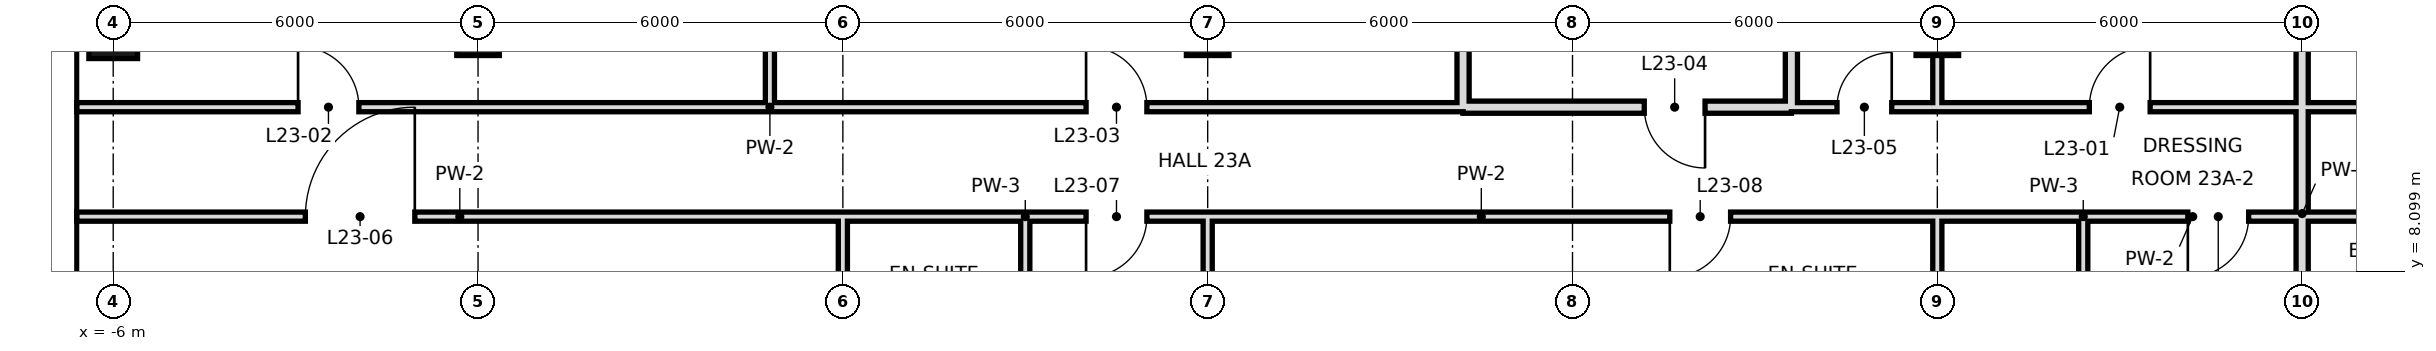
"""IFC4 building model, lengths in metres.
Left out: names, types, materials, properties, quantities, classifications, styles, units other than length and angle.
Written with IfcOpenShell. Run it as: python <this file> out.ifc"""

import sys

from ifc_helpers import new_model, si_unit, direction, frame, frame_2d, origin, origin_2d, place, context, subcontext, project, spatial, rectangle, hollow_rectangle, extrude, element, fill, save


model = new_model("IFC4")
c1 = context("Model", 3, precision=1e-05, world=origin(), true_north=direction((0.0, 1.0)))
c2 = subcontext(c1, "Body", "Model", "MODEL_VIEW")
j1 = project(units=[si_unit("LENGTHUNIT", "METRE"), si_unit("PLANEANGLEUNIT", "RADIAN")], contexts=[c1])
p1 = place(None, origin())
s1 = spatial("IfcSite", under=j1, at=p1, CompositionType="ELEMENT")
p2 = place(p1, origin())
s2 = spatial("IfcBuilding", under=s1, at=p2, CompositionType="ELEMENT")
p3 = place(p2, frame((0.0, 0.0, 107.0)))
s3 = spatial("IfcBuildingStorey", under=s2, at=p3, CompositionType="ELEMENT", Elevation=107.0)
p4 = place(p3, frame((-6.0, 12.0, 0.0), z_axis=(0.0, 0.0, 1.0), x_axis=(1.0, 0.0, 0.0)))
e1 = element("IfcColumn", 1, at=p4, inside=s3, PredefinedType="COLUMN", context=c2, shape_type="SweptSolid", body=[
    extrude(hollow_rectangle(XDim=0.8, YDim=0.8, WallThickness=0.04, at=origin_2d()), origin(), (0.0, 0.0, 1.0), 3.6),
])
for number, where, z_axis, x_axis in (
    (2, (0.0, 12.0, 0.0), (0.0, 0.0, 1.0), (1.0, 0.0, 0.0)),
    (3, (12.0, 12.0, 0.0), (0.0, 0.0, 1.0), (1.0, 0.0, 0.0)),
    (4, (24.0, 12.0, 0.0), (0.0, 0.0, 1.0), (1.0, 0.0, 0.0)),
):
    element("IfcColumn", number, at=place(p3, frame(where, z_axis=z_axis, x_axis=x_axis)), inside=s3, PredefinedType="COLUMN", context=c2, shape_type="SweptSolid", body=[
        extrude(hollow_rectangle(XDim=0.7, YDim=0.7, WallThickness=0.036, at=origin_2d()), origin(), (0.0, 0.0, 1.0), 3.6),
    ])
p5 = place(p3, frame((12.0, 0.0, 0.0), z_axis=(0.0, 0.0, 1.0), x_axis=(0.0, 1.0, 0.0)))
e5 = element("IfcWall", 5, at=p5, inside=s3, PredefinedType="PARTITIONING", context=c2, shape_type="SweptSolid", body=[
    extrude(rectangle(XDim=9.0, YDim=0.15, at=frame_2d((4.5, 0.0))), origin(), (0.0, 0.0, 1.0), 2.72),
])
for number, where, z_axis, x_axis in (
    (6, (16.2, 10.8, 0.0), (0.0, 0.0, 1.0), (0.0, 1.0, 0.0)),
    (7, (21.6, 10.8, 0.0), (0.0, 0.0, 1.0), (0.0, 1.0, 0.0)),
):
    element("IfcWall", number, at=place(p3, frame(where, z_axis=z_axis, x_axis=x_axis)), inside=s3, PredefinedType="SOLIDWALL", context=c2, shape_type="SweptSolid", body=[
        extrude(rectangle(XDim=7.9, YDim=0.2, at=frame_2d((3.95, 0.0))), origin(), (0.0, 0.0, 1.0), 2.72),
    ])
p6 = place(p3, frame((24.0, 6.0, 0.0), z_axis=(0.0, 0.0, 1.0), x_axis=(0.0, 1.0, 0.0)))
e8 = element("IfcWall", 8, at=p6, inside=s3, PredefinedType="PARTITIONING", context=c2, shape_type="SweptSolid", body=[
    extrude(rectangle(XDim=3.0, YDim=0.15, at=frame_2d((1.5, 0.0))), origin(), (0.0, 0.0, 1.0), 2.72),
])
p7 = place(p3, frame((24.0, 10.8, 0.0), z_axis=(0.0, 0.0, 1.0), x_axis=(0.0, 1.0, 0.0)))
e9 = element("IfcWall", 9, at=p7, inside=s3, PredefinedType="PARTITIONING", context=c2, shape_type="SweptSolid", body=[
    extrude(rectangle(XDim=7.9, YDim=0.15, at=frame_2d((3.95, 0.0))), origin(), (0.0, 0.0, 1.0), 2.72),
])
p8 = place(p3, frame((26.4, 6.0, 0.0), z_axis=(0.0, 0.0, 1.0), x_axis=(0.0, 1.0, 0.0)))
e10 = element("IfcWall", 10, at=p8, inside=s3, PredefinedType="PARTITIONING", context=c2, shape_type="SweptSolid", body=[
    extrude(rectangle(XDim=3.0, YDim=0.15, at=frame_2d((1.5, 0.0))), origin(), (0.0, 0.0, 1.0), 3.42),
])
p9 = place(p3, frame((30.0, -0.6, 0.0), z_axis=(0.0, 0.0, 1.0), x_axis=(0.0, 1.0, 0.0)))
e11 = element("IfcWall", 11, at=p9, inside=s3, PredefinedType="SOLIDWALL", context=c2, shape_type="SweptSolid", body=[
    extrude(rectangle(XDim=19.3, YDim=0.2, at=frame_2d((9.65, 0.0))), origin(), (0.0, 0.0, 1.0), 2.72),
])
p10 = place(p3, frame((4.8, 10.8, 0.0), z_axis=(0.0, 0.0, 1.0), x_axis=(0.0, 1.0, 0.0)))
e12 = element("IfcWall", 12, at=p10, inside=s3, PredefinedType="PARTITIONING", context=c2, shape_type="SweptSolid", body=[
    extrude(rectangle(XDim=7.9, YDim=0.15, at=frame_2d((3.95, 0.0))), origin(), (0.0, 0.0, 1.0), 3.42),
])
p11 = place(p3, frame((6.0, 6.0, 0.0), z_axis=(0.0, 0.0, 1.0), x_axis=(0.0, 1.0, 0.0)))
e13 = element("IfcWall", 13, at=p11, inside=s3, PredefinedType="PARTITIONING", context=c2, shape_type="SweptSolid", body=[
    extrude(rectangle(XDim=3.0, YDim=0.15, at=frame_2d((1.5, 0.0))), origin(), (0.0, 0.0, 1.0), 2.72),
])
p12 = place(p3, frame((9.0, 6.0, 0.0), z_axis=(0.0, 0.0, 1.0), x_axis=(0.0, 1.0, 0.0)))
e14 = element("IfcWall", 14, at=p12, inside=s3, PredefinedType="PARTITIONING", context=c2, shape_type="SweptSolid", body=[
    extrude(rectangle(XDim=3.0, YDim=0.15, at=frame_2d((1.5, 0.0))), origin(), (0.0, 0.0, 1.0), 3.42),
])
p13 = place(p3, frame((16.2, 10.8, 0.0), z_axis=(0.0, 0.0, 1.0), x_axis=(1.0, 0.0, 0.0)))
e15 = element("IfcWall", 15, at=p13, inside=s3, PredefinedType="SOLIDWALL", context=c2, shape_type="SweptSolid", body=[
    extrude(rectangle(XDim=5.4, YDim=0.2, at=frame_2d((2.7, 0.0))), origin(), (0.0, 0.0, 1.0), 2.72),
])
p14 = place(p13, frame((2.98, 0.0, 0.0)))
e16 = element("IfcOpeningElement", 16, at=p14, cuts=e15, PredefinedType="OPENING", context=c2, shape_type="SweptSolid", body=[
    extrude(rectangle(XDim=1.0, YDim=2.4, at=frame_2d((0.5, 1.2))), frame((0.0, 0.11, 0.0), z_axis=(0.0, -1.0, 0.0), x_axis=(1.0, 0.0, 0.0)), (0.0, 0.0, 1.0), 0.22),
])
p15 = place(p3, frame((-6.6, 10.8, 0.0), z_axis=(0.0, 0.0, 1.0), x_axis=(1.0, 0.0, 0.0)))
e17 = element("IfcWall", 17, at=p15, inside=s3, PredefinedType="PARTITIONING", context=c2, shape_type="SweptSolid", body=[
    extrude(rectangle(XDim=22.8, YDim=0.15, at=frame_2d((11.4, 0.0))), origin(), (0.0, 0.0, 1.0), 3.42),
])
p16 = place(p15, frame((3.64, 0.0, 0.0)))
e18 = element("IfcOpeningElement", 18, at=p16, cuts=e17, PredefinedType="OPENING", context=c2, shape_type="SweptSolid", body=[
    extrude(rectangle(XDim=1.0, YDim=2.4, at=frame_2d((0.5, 1.2))), frame((0.0, 0.085, 0.0), z_axis=(0.0, -1.0, 0.0), x_axis=(1.0, 0.0, 0.0)), (0.0, 0.0, 1.0), 0.17),
])
p17 = place(p15, frame((16.6, 0.0, 0.0)))
e19 = element("IfcOpeningElement", 19, at=p17, cuts=e17, PredefinedType="OPENING", context=c2, shape_type="SweptSolid", body=[
    extrude(rectangle(XDim=1.0, YDim=2.4, at=frame_2d((0.5, 1.2))), frame((0.0, 0.085, 0.0), z_axis=(0.0, -1.0, 0.0), x_axis=(1.0, 0.0, 0.0)), (0.0, 0.0, 1.0), 0.17),
])
p18 = place(p3, frame((24.0, 10.8, 0.0), z_axis=(0.0, 0.0, 1.0), x_axis=(1.0, 0.0, 0.0)))
e20 = element("IfcWall", 20, at=p18, inside=s3, PredefinedType="PARTITIONING", context=c2, shape_type="SweptSolid", body=[
    extrude(rectangle(XDim=18.0, YDim=0.15, at=frame_2d((9.0, 0.0))), origin(), (0.0, 0.0, 1.0), 3.42),
])
p19 = place(p18, frame((2.5, 0.0, 0.0)))
e21 = element("IfcOpeningElement", 21, at=p19, cuts=e20, PredefinedType="OPENING", context=c2, shape_type="SweptSolid", body=[
    extrude(rectangle(XDim=1.0, YDim=2.4, at=frame_2d((0.5, 1.2))), frame((0.0, 0.085, 0.0), z_axis=(0.0, -1.0, 0.0), x_axis=(1.0, 0.0, 0.0)), (0.0, 0.0, 1.0), 0.17),
])
p20 = place(p18, frame((15.4, 0.0, 0.0)))
e22 = element("IfcOpeningElement", 22, at=p20, cuts=e20, PredefinedType="OPENING", context=c2, shape_type="SweptSolid", body=[
    extrude(rectangle(XDim=1.0, YDim=2.4, at=frame_2d((0.5, 1.2))), frame((0.0, 0.085, 0.0), z_axis=(0.0, -1.0, 0.0), x_axis=(1.0, 0.0, 0.0)), (0.0, 0.0, 1.0), 0.17),
])
p21 = place(p18, frame((8.55, 0.0, 0.0)))
e23 = element("IfcOpeningElement", 23, at=p21, cuts=e20, PredefinedType="OPENING", context=c2, shape_type="SweptSolid", body=[
    extrude(rectangle(XDim=0.9, YDim=2.1, at=frame_2d((0.45, 1.05))), frame((0.0, 0.085, 0.0), z_axis=(0.0, -1.0, 0.0), x_axis=(1.0, 0.0, 0.0)), (0.0, 0.0, 1.0), 0.17),
])
p22 = place(p3, frame((21.6, 10.8, 0.0), z_axis=(0.0, 0.0, 1.0), x_axis=(1.0, 0.0, 0.0)))
e24 = element("IfcWall", 24, at=p22, inside=s3, PredefinedType="PARTITIONING", context=c2, shape_type="SweptSolid", body=[
    extrude(rectangle(XDim=2.4, YDim=0.15, at=frame_2d((1.2, 0.0))), origin(), (0.0, 0.0, 1.0), 3.42),
])
p23 = place(p22, frame((0.75, 0.0, 0.0)))
e25 = element("IfcOpeningElement", 25, at=p23, cuts=e24, PredefinedType="OPENING", context=c2, shape_type="SweptSolid", body=[
    extrude(rectangle(XDim=0.9, YDim=2.4, at=frame_2d((0.45, 1.2))), frame((0.0, 0.085, 0.0), z_axis=(0.0, -1.0, 0.0), x_axis=(1.0, 0.0, 0.0)), (0.0, 0.0, 1.0), 0.17),
])
p24 = place(p3, frame((-6.6, 9.0, 0.0), z_axis=(0.0, 0.0, 1.0), x_axis=(1.0, 0.0, 0.0)))
e26 = element("IfcWall", 26, at=p24, inside=s3, PredefinedType="PARTITIONING", context=c2, shape_type="SweptSolid", body=[
    extrude(rectangle(XDim=12.6, YDim=0.15, at=frame_2d((6.3, 0.0))), origin(), (0.0, 0.0, 1.0), 3.42),
])
p25 = place(p24, frame((3.76, 0.0, 0.0)))
e27 = element("IfcOpeningElement", 27, at=p25, cuts=e26, PredefinedType="OPENING", context=c2, shape_type="SweptSolid", body=[
    extrude(rectangle(XDim=1.8, YDim=2.4, at=frame_2d((0.9, 1.2))), frame((0.0, 0.085, 0.0), z_axis=(0.0, -1.0, 0.0), x_axis=(1.0, 0.0, 0.0)), (0.0, 0.0, 1.0), 0.17),
])
p26 = place(p3, frame((9.0, 9.0, 0.0), z_axis=(0.0, 0.0, 1.0), x_axis=(1.0, 0.0, 0.0)))
e28 = element("IfcWall", 28, at=p26, inside=s3, PredefinedType="PARTITIONING", context=c2, shape_type="SweptSolid", body=[
    extrude(rectangle(XDim=15.0, YDim=0.15, at=frame_2d((7.5, 0.0))), origin(), (0.0, 0.0, 1.0), 3.42),
])
p27 = place(p26, frame((1.0, 0.0, 0.0)))
e29 = element("IfcOpeningElement", 29, at=p27, cuts=e28, PredefinedType="OPENING", context=c2, shape_type="SweptSolid", body=[
    extrude(rectangle(XDim=1.0, YDim=2.4, at=frame_2d((0.5, 1.2))), frame((0.0, 0.085, 0.0), z_axis=(0.0, -1.0, 0.0), x_axis=(1.0, 0.0, 0.0)), (0.0, 0.0, 1.0), 0.17),
])
p28 = place(p26, frame((10.6, 0.0, 0.0)))
e30 = element("IfcOpeningElement", 30, at=p28, cuts=e28, PredefinedType="OPENING", context=c2, shape_type="SweptSolid", body=[
    extrude(rectangle(XDim=1.0, YDim=2.4, at=frame_2d((0.5, 1.2))), frame((0.0, 0.085, 0.0), z_axis=(0.0, -1.0, 0.0), x_axis=(1.0, 0.0, 0.0)), (0.0, 0.0, 1.0), 0.17),
])
p29 = place(p3, frame((26.4, 9.0, 0.0), z_axis=(0.0, 0.0, 1.0), x_axis=(1.0, 0.0, 0.0)))
e31 = element("IfcWall", 31, at=p29, inside=s3, PredefinedType="PARTITIONING", context=c2, shape_type="SweptSolid", body=[
    extrude(rectangle(XDim=3.6, YDim=0.15, at=frame_2d((1.8, 0.0))), origin(), (0.0, 0.0, 1.0), 3.42),
])
p30 = place(p29, frame((1.72, 0.0, 0.0)))
e32 = element("IfcOpeningElement", 32, at=p30, cuts=e31, PredefinedType="OPENING", context=c2, shape_type="SweptSolid", body=[
    extrude(rectangle(XDim=1.0, YDim=2.4, at=frame_2d((0.5, 1.2))), frame((0.0, 0.085, 0.0), z_axis=(0.0, -1.0, 0.0), x_axis=(1.0, 0.0, 0.0)), (0.0, 0.0, 1.0), 0.17),
])
p31 = place(p3, frame((6.0, 9.0, 0.0), z_axis=(0.0, 0.0, 1.0), x_axis=(1.0, 0.0, 0.0)))
e33 = element("IfcWall", 33, at=p31, inside=s3, PredefinedType="PARTITIONING", context=c2, shape_type="SweptSolid", body=[
    extrude(rectangle(XDim=3.0, YDim=0.15, at=frame_2d((1.5, 0.0))), origin(), (0.0, 0.0, 1.0), 3.42),
])
p32 = place(p3, frame((24.0, 9.0, 0.0), z_axis=(0.0, 0.0, 1.0), x_axis=(1.0, 0.0, 0.0)))
e34 = element("IfcWall", 34, at=p32, inside=s3, PredefinedType="PARTITIONING", context=c2, shape_type="SweptSolid", body=[
    extrude(rectangle(XDim=2.4, YDim=0.15, at=frame_2d((1.2, 0.0))), origin(), (0.0, 0.0, 1.0), 3.42),
])
p33 = place(p3, frame((30.0, 9.0, 0.0), z_axis=(0.0, 0.0, 1.0), x_axis=(1.0, 0.0, 0.0)))
e35 = element("IfcWall", 35, at=p33, inside=s3, PredefinedType="PARTITIONING", context=c2, shape_type="SweptSolid", body=[
    extrude(rectangle(XDim=3.0, YDim=0.15, at=frame_2d((1.5, 0.0))), origin(), (0.0, 0.0, 1.0), 3.42),
])
p34 = place(p19, frame((1.0, 0.0, 0.0), z_axis=(0.0, 0.0, 1.0), x_axis=(-1.0, 0.0, 0.0)))
e36 = element("IfcDoor", 36, at=p34, inside=s3, OperationType="SINGLE_SWING_LEFT", PredefinedType="DOOR", context=c2, shape_type="SweptSolid", body=[
    extrude(rectangle(XDim=1.0, YDim=2.4, at=frame_2d((0.5, 1.2))), frame((0.0, 0.025, 0.0), z_axis=(0.0, -1.0, 0.0), x_axis=(1.0, 0.0, 0.0)), (0.0, 0.0, 1.0), 0.05),
])
fill(e21, e36)
p35 = place(p16, origin())
e37 = element("IfcDoor", 37, at=p35, inside=s3, OperationType="SINGLE_SWING_LEFT", PredefinedType="DOOR", context=c2, shape_type="SweptSolid", body=[
    extrude(rectangle(XDim=1.0, YDim=2.4, at=frame_2d((0.5, 1.2))), frame((0.0, 0.025, 0.0), z_axis=(0.0, -1.0, 0.0), x_axis=(1.0, 0.0, 0.0)), (0.0, 0.0, 1.0), 0.05),
])
fill(e18, e37)
p36 = place(p17, origin())
e38 = element("IfcDoor", 38, at=p36, inside=s3, OperationType="SINGLE_SWING_LEFT", PredefinedType="DOOR", context=c2, shape_type="SweptSolid", body=[
    extrude(rectangle(XDim=1.0, YDim=2.4, at=frame_2d((0.5, 1.2))), frame((0.0, 0.025, 0.0), z_axis=(0.0, -1.0, 0.0), x_axis=(1.0, 0.0, 0.0)), (0.0, 0.0, 1.0), 0.05),
])
fill(e19, e38)
p37 = place(p14, origin())
e39 = element("IfcDoor", 39, at=p37, inside=s3, OperationType="SINGLE_SWING_RIGHT", PredefinedType="DOOR", context=c2, shape_type="SweptSolid", body=[
    extrude(rectangle(XDim=1.0, YDim=2.4, at=frame_2d((0.5, 1.2))), frame((0.0, 0.025, 0.0), z_axis=(0.0, -1.0, 0.0), x_axis=(1.0, 0.0, 0.0)), (0.0, 0.0, 1.0), 0.05),
])
fill(e16, e39)
p38 = place(p23, frame((0.9, 0.0, 0.0), z_axis=(0.0, 0.0, 1.0), x_axis=(-1.0, 0.0, 0.0)))
e40 = element("IfcDoor", 40, at=p38, inside=s3, OperationType="SINGLE_SWING_LEFT", PredefinedType="DOOR", context=c2, shape_type="SweptSolid", body=[
    extrude(rectangle(XDim=0.9, YDim=2.4, at=frame_2d((0.45, 1.2))), frame((0.0, 0.025, 0.0), z_axis=(0.0, -1.0, 0.0), x_axis=(1.0, 0.0, 0.0)), (0.0, 0.0, 1.0), 0.05),
])
fill(e25, e40)
p39 = place(p25, frame((1.8, 0.0, 0.0), z_axis=(0.0, 0.0, 1.0), x_axis=(-1.0, 0.0, 0.0)))
e41 = element("IfcDoor", 41, at=p39, inside=s3, OperationType="SINGLE_SWING_LEFT", PredefinedType="DOOR", context=c2, shape_type="SweptSolid", body=[
    extrude(rectangle(XDim=1.8, YDim=2.4, at=frame_2d((0.9, 1.2))), frame((0.0, 0.025, 0.0), z_axis=(0.0, -1.0, 0.0), x_axis=(1.0, 0.0, 0.0)), (0.0, 0.0, 1.0), 0.05),
])
fill(e27, e41)
p40 = place(p27, frame((1.0, 0.0, 0.0), z_axis=(0.0, 0.0, 1.0), x_axis=(-1.0, 0.0, 0.0)))
e42 = element("IfcDoor", 42, at=p40, inside=s3, OperationType="SINGLE_SWING_RIGHT", PredefinedType="DOOR", context=c2, shape_type="SweptSolid", body=[
    extrude(rectangle(XDim=1.0, YDim=2.4, at=frame_2d((0.5, 1.2))), frame((0.0, 0.025, 0.0), z_axis=(0.0, -1.0, 0.0), x_axis=(1.0, 0.0, 0.0)), (0.0, 0.0, 1.0), 0.05),
])
fill(e29, e42)
p41 = place(p28, frame((1.0, 0.0, 0.0), z_axis=(0.0, 0.0, 1.0), x_axis=(-1.0, 0.0, 0.0)))
e43 = element("IfcDoor", 43, at=p41, inside=s3, OperationType="SINGLE_SWING_RIGHT", PredefinedType="DOOR", context=c2, shape_type="SweptSolid", body=[
    extrude(rectangle(XDim=1.0, YDim=2.4, at=frame_2d((0.5, 1.2))), frame((0.0, 0.025, 0.0), z_axis=(0.0, -1.0, 0.0), x_axis=(1.0, 0.0, 0.0)), (0.0, 0.0, 1.0), 0.05),
])
fill(e30, e43)
p42 = place(p30, frame((1.0, 0.0, 0.0), z_axis=(0.0, 0.0, 1.0), x_axis=(-1.0, 0.0, 0.0)))
e44 = element("IfcDoor", 44, at=p42, inside=s3, OperationType="SINGLE_SWING_RIGHT", PredefinedType="DOOR", context=c2, shape_type="SweptSolid", body=[
    extrude(rectangle(XDim=1.0, YDim=2.4, at=frame_2d((0.5, 1.2))), frame((0.0, 0.025, 0.0), z_axis=(0.0, -1.0, 0.0), x_axis=(1.0, 0.0, 0.0)), (0.0, 0.0, 1.0), 0.05),
])
fill(e32, e44)
save(model, sys.argv[1])
